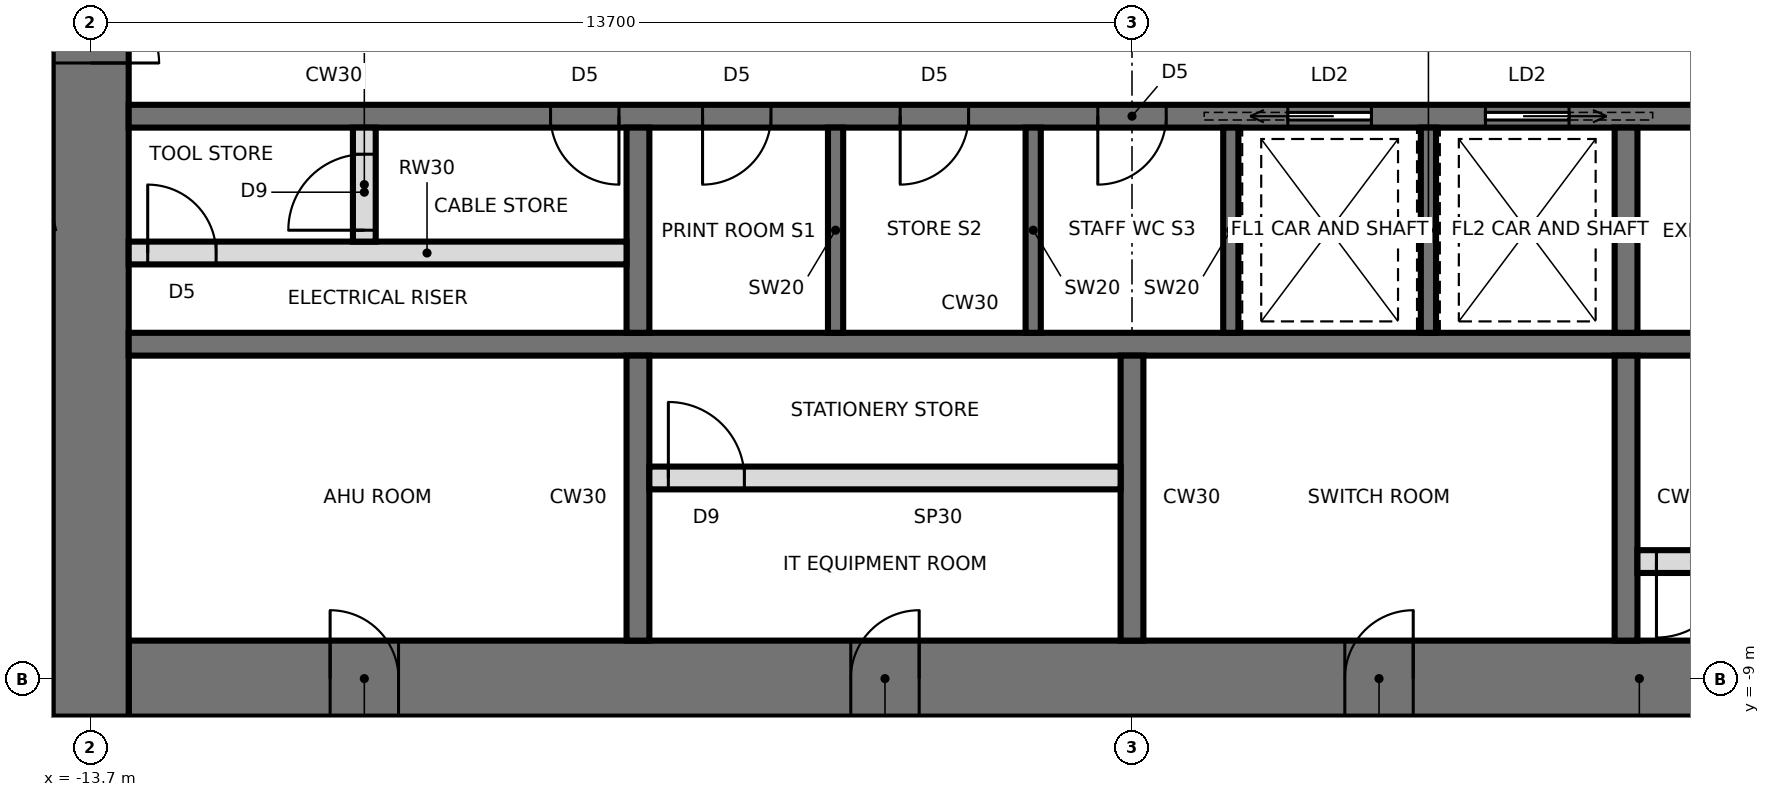
"""IFC4 building model, lengths in metres.
Left out: names, types, materials, properties, quantities, classifications, styles, units other than length and angle.
Written with IfcOpenShell. Run it as: python <this file> out.ifc"""

import sys

from ifc_helpers import new_model, si_unit, direction, frame, frame_2d, origin, place, context, subcontext, project, spatial, rectangle, extrude, element, fill, save


model = new_model("IFC4")
c1 = context("Model", 3, precision=1e-05, world=origin(), true_north=direction((0.0, 1.0)))
c2 = subcontext(c1, "Body", "Model", "MODEL_VIEW")
j1 = project(units=[si_unit("LENGTHUNIT", "METRE"), si_unit("PLANEANGLEUNIT", "RADIAN")], contexts=[c1])
p1 = place(None, origin())
s1 = spatial("IfcSite", under=j1, at=p1, CompositionType="ELEMENT")
p2 = place(p1, origin())
s2 = spatial("IfcBuilding", under=s1, at=p2, CompositionType="ELEMENT")
p3 = place(p2, frame((0.0, 0.0, 272.8)))
s3 = spatial("IfcBuildingStorey", under=s2, at=p3, CompositionType="ELEMENT", Elevation=272.8)
p4 = place(p3, frame((-13.2, -9.0, 0.0), z_axis=(0.0, 0.0, 1.0), x_axis=(1.0, 0.0, 0.0)))
e1 = element("IfcWall", 1, at=p4, inside=s3, PredefinedType="SHEAR", context=c2, shape_type="SweptSolid", body=[
    extrude(rectangle(XDim=26.4, YDim=1.0, at=frame_2d((13.2, 0.0))), origin(), (0.0, 0.0, 1.0), 4.2),
])
p5 = place(p4, frame((2.65, 0.0, 0.0)))
e2 = element("IfcOpeningElement", 2, at=p5, cuts=e1, PredefinedType="OPENING", context=c2, shape_type="SweptSolid", body=[
    extrude(rectangle(XDim=0.9, YDim=2.1, at=frame_2d((0.45, 1.05))), frame((0.0, 0.51, 0.0), z_axis=(0.0, -1.0, 0.0), x_axis=(1.0, 0.0, 0.0)), (0.0, 0.0, 1.0), 1.02),
])
p6 = place(p4, frame((9.5, 0.0, 0.0)))
e3 = element("IfcOpeningElement", 3, at=p6, cuts=e1, PredefinedType="OPENING", context=c2, shape_type="SweptSolid", body=[
    extrude(rectangle(XDim=0.9, YDim=2.1, at=frame_2d((0.45, 1.05))), frame((0.0, 0.51, 0.0), z_axis=(0.0, -1.0, 0.0), x_axis=(1.0, 0.0, 0.0)), (0.0, 0.0, 1.0), 1.02),
])
p7 = place(p4, frame((16.0, 0.0, 0.0)))
e4 = element("IfcOpeningElement", 4, at=p7, cuts=e1, PredefinedType="OPENING", context=c2, shape_type="SweptSolid", body=[
    extrude(rectangle(XDim=0.9, YDim=2.1, at=frame_2d((0.45, 1.05))), frame((0.0, 0.51, 0.0), z_axis=(0.0, -1.0, 0.0), x_axis=(1.0, 0.0, 0.0)), (0.0, 0.0, 1.0), 1.02),
])
p8 = place(p4, frame((22.85, 0.0, 0.0)))
e5 = element("IfcOpeningElement", 5, at=p8, cuts=e1, PredefinedType="OPENING", context=c2, shape_type="SweptSolid", body=[
    extrude(rectangle(XDim=0.9, YDim=2.1, at=frame_2d((0.45, 1.05))), frame((0.0, 0.51, 0.0), z_axis=(0.0, -1.0, 0.0), x_axis=(1.0, 0.0, 0.0)), (0.0, 0.0, 1.0), 1.02),
])
p9 = place(p3, frame((-13.7, 9.5, 0.0), z_axis=(0.0, 0.0, 1.0), x_axis=(0.0, -1.0, 0.0)))
e6 = element("IfcWall", 6, at=p9, inside=s3, PredefinedType="SHEAR", context=c2, shape_type="SweptSolid", body=[
    extrude(rectangle(XDim=19.0, YDim=1.0, at=frame_2d((9.5, 0.0))), origin(), (0.0, 0.0, 1.0), 4.2),
])
p10 = place(p9, frame((8.6, 0.0, 0.0)))
e7 = element("IfcOpeningElement", 7, at=p10, cuts=e6, PredefinedType="OPENING", context=c2, shape_type="SweptSolid", body=[
    extrude(rectangle(XDim=1.8, YDim=2.4, at=frame_2d((0.9, 1.2))), frame((0.0, 0.51, 0.0), z_axis=(0.0, -1.0, 0.0), x_axis=(1.0, 0.0, 0.0)), (0.0, 0.0, 1.0), 1.02),
])
p11 = place(p3, frame((-13.2, -1.6, 0.0), z_axis=(0.0, 0.0, 1.0), x_axis=(1.0, 0.0, 0.0)))
e8 = element("IfcWall", 8, at=p11, inside=s3, PredefinedType="SHEAR", context=c2, shape_type="SweptSolid", body=[
    extrude(rectangle(XDim=26.4, YDim=0.3, at=frame_2d((13.2, 0.0))), origin(), (0.0, 0.0, 1.0), 4.2),
])
p12 = place(p11, frame((25.15, 0.0, 0.0)))
e9 = element("IfcOpeningElement", 9, at=p12, cuts=e8, PredefinedType="OPENING", context=c2, shape_type="SweptSolid", body=[
    extrude(rectangle(XDim=1.0, YDim=2.1, at=frame_2d((0.5, 1.05))), frame((0.0, 0.16, 0.0), z_axis=(0.0, -1.0, 0.0), x_axis=(1.0, 0.0, 0.0)), (0.0, 0.0, 1.0), 0.32),
])
p13 = place(p11, frame((7.55, 0.0, 0.0)))
e10 = element("IfcOpeningElement", 10, at=p13, cuts=e8, PredefinedType="OPENING", context=c2, shape_type="SweptSolid", body=[
    extrude(rectangle(XDim=0.9, YDim=2.1, at=frame_2d((0.45, 1.05))), frame((0.0, 0.16, 0.0), z_axis=(0.0, -1.0, 0.0), x_axis=(1.0, 0.0, 0.0)), (0.0, 0.0, 1.0), 0.32),
])
p14 = place(p11, frame((10.15, 0.0, 0.0)))
e11 = element("IfcOpeningElement", 11, at=p14, cuts=e8, PredefinedType="OPENING", context=c2, shape_type="SweptSolid", body=[
    extrude(rectangle(XDim=0.9, YDim=2.1, at=frame_2d((0.45, 1.05))), frame((0.0, 0.16, 0.0), z_axis=(0.0, -1.0, 0.0), x_axis=(1.0, 0.0, 0.0)), (0.0, 0.0, 1.0), 0.32),
])
p15 = place(p11, frame((12.75, 0.0, 0.0)))
e12 = element("IfcOpeningElement", 12, at=p15, cuts=e8, PredefinedType="OPENING", context=c2, shape_type="SweptSolid", body=[
    extrude(rectangle(XDim=0.9, YDim=2.1, at=frame_2d((0.45, 1.05))), frame((0.0, 0.16, 0.0), z_axis=(0.0, -1.0, 0.0), x_axis=(1.0, 0.0, 0.0)), (0.0, 0.0, 1.0), 0.32),
])
p16 = place(p11, frame((15.25, 0.0, 0.0)))
e13 = element("IfcOpeningElement", 13, at=p16, cuts=e8, PredefinedType="OPENING", context=c2, shape_type="SweptSolid", body=[
    extrude(rectangle(XDim=1.1, YDim=2.3, at=frame_2d((0.55, 1.15))), frame((0.0, 0.16, 0.0), z_axis=(0.0, -1.0, 0.0), x_axis=(1.0, 0.0, 0.0)), (0.0, 0.0, 1.0), 0.32),
])
p17 = place(p11, frame((17.85, 0.0, 0.0)))
e14 = element("IfcOpeningElement", 14, at=p17, cuts=e8, PredefinedType="OPENING", context=c2, shape_type="SweptSolid", body=[
    extrude(rectangle(XDim=1.1, YDim=2.3, at=frame_2d((0.55, 1.15))), frame((0.0, 0.16, 0.0), z_axis=(0.0, -1.0, 0.0), x_axis=(1.0, 0.0, 0.0)), (0.0, 0.0, 1.0), 0.32),
])
p18 = place(p11, frame((5.55, 0.0, 0.0)))
e15 = element("IfcOpeningElement", 15, at=p18, cuts=e8, PredefinedType="OPENING", context=c2, shape_type="SweptSolid", body=[
    extrude(rectangle(XDim=0.9, YDim=2.1, at=frame_2d((0.45, 1.05))), frame((0.0, 0.16, 0.0), z_axis=(0.0, -1.0, 0.0), x_axis=(1.0, 0.0, 0.0)), (0.0, 0.0, 1.0), 0.32),
])
p19 = place(p3, frame((-13.2, -4.6, 0.0), z_axis=(0.0, 0.0, 1.0), x_axis=(1.0, 0.0, 0.0)))
e16 = element("IfcWall", 16, at=p19, inside=s3, PredefinedType="SHEAR", context=c2, shape_type="SweptSolid", body=[
    extrude(rectangle(XDim=26.4, YDim=0.3, at=frame_2d((13.2, 0.0))), origin(), (0.0, 0.0, 1.0), 4.2),
])
p20 = place(p3, frame((-6.5, -1.75, 0.0), z_axis=(0.0, 0.0, 1.0), x_axis=(0.0, -1.0, 0.0)))
e17 = element("IfcWall", 17, at=p20, inside=s3, PredefinedType="SHEAR", context=c2, shape_type="SweptSolid", body=[
    extrude(rectangle(XDim=2.7, YDim=0.3, at=frame_2d((1.35, 0.0))), origin(), (0.0, 0.0, 1.0), 4.2),
])
p21 = place(p3, frame((-6.5, -4.75, 0.0), z_axis=(0.0, 0.0, 1.0), x_axis=(0.0, -1.0, 0.0)))
e18 = element("IfcWall", 18, at=p21, inside=s3, PredefinedType="SHEAR", context=c2, shape_type="SweptSolid", body=[
    extrude(rectangle(XDim=3.75, YDim=0.3, at=frame_2d((1.875, 0.0))), origin(), (0.0, 0.0, 1.0), 4.2),
])
p22 = place(p3, frame((6.5, -1.75, 0.0), z_axis=(0.0, 0.0, 1.0), x_axis=(0.0, -1.0, 0.0)))
e19 = element("IfcWall", 19, at=p22, inside=s3, PredefinedType="SHEAR", context=c2, shape_type="SweptSolid", body=[
    extrude(rectangle(XDim=2.7, YDim=0.3, at=frame_2d((1.35, 0.0))), origin(), (0.0, 0.0, 1.0), 4.2),
])
p23 = place(p3, frame((6.5, -4.75, 0.0), z_axis=(0.0, 0.0, 1.0), x_axis=(0.0, -1.0, 0.0)))
e20 = element("IfcWall", 20, at=p23, inside=s3, PredefinedType="SHEAR", context=c2, shape_type="SweptSolid", body=[
    extrude(rectangle(XDim=3.75, YDim=0.3, at=frame_2d((1.875, 0.0))), origin(), (0.0, 0.0, 1.0), 4.2),
])
for number, where, z_axis, x_axis in (
    (21, (-3.9, -1.75, 0.0), (0.0, 0.0, 1.0), (0.0, -1.0, 0.0)),
    (22, (-1.3, -1.75, 0.0), (0.0, 0.0, 1.0), (0.0, -1.0, 0.0)),
    (23, (1.3, -1.75, 0.0), (0.0, 0.0, 1.0), (0.0, -1.0, 0.0)),
    (24, (3.9, -1.75, 0.0), (0.0, 0.0, 1.0), (0.0, -1.0, 0.0)),
):
    element("IfcWall", number, at=place(p3, frame(where, z_axis=z_axis, x_axis=x_axis)), inside=s3, PredefinedType="SHEAR", context=c2, shape_type="SweptSolid", body=[
        extrude(rectangle(XDim=2.7, YDim=0.2, at=frame_2d((1.35, 0.0))), origin(), (0.0, 0.0, 1.0), 4.2),
    ])
p24 = place(p3, frame((0.0, -4.75, 0.0), z_axis=(0.0, 0.0, 1.0), x_axis=(0.0, -1.0, 0.0)))
e25 = element("IfcWall", 25, at=p24, inside=s3, PredefinedType="SHEAR", context=c2, shape_type="SweptSolid", body=[
    extrude(rectangle(XDim=3.75, YDim=0.3, at=frame_2d((1.875, 0.0))), origin(), (0.0, 0.0, 1.0), 4.2),
])
p25 = place(p3, frame((-6.35, -6.36, 0.0), z_axis=(0.0, 0.0, 1.0), x_axis=(1.0, 0.0, 0.0)))
e26 = element("IfcWall", 26, at=p25, inside=s3, PredefinedType="PARTITIONING", context=c2, shape_type="SweptSolid", body=[
    extrude(rectangle(XDim=6.2, YDim=0.3, at=frame_2d((3.1, 0.0))), origin(), (0.0, 0.0, 1.0), 4.0),
])
p26 = place(p25, frame((0.25, 0.0, 0.0)))
e27 = element("IfcOpeningElement", 27, at=p26, cuts=e26, PredefinedType="OPENING", context=c2, shape_type="SweptSolid", body=[
    extrude(rectangle(XDim=1.0, YDim=2.4, at=frame_2d((0.5, 1.2))), frame((0.0, 0.16, 0.0), z_axis=(0.0, -1.0, 0.0), x_axis=(1.0, 0.0, 0.0)), (0.0, 0.0, 1.0), 0.32),
])
p27 = place(p3, frame((6.65, -7.46, 0.0), z_axis=(0.0, 0.0, 1.0), x_axis=(1.0, 0.0, 0.0)))
e28 = element("IfcWall", 28, at=p27, inside=s3, PredefinedType="PARTITIONING", context=c2, shape_type="SweptSolid", body=[
    extrude(rectangle(XDim=6.55, YDim=0.3, at=frame_2d((3.275, 0.0))), origin(), (0.0, 0.0, 1.0), 4.0),
])
p28 = place(p27, frame((0.25, 0.0, 0.0)))
e29 = element("IfcOpeningElement", 29, at=p28, cuts=e28, PredefinedType="OPENING", context=c2, shape_type="SweptSolid", body=[
    extrude(rectangle(XDim=1.0, YDim=2.4, at=frame_2d((0.5, 1.2))), frame((0.0, 0.16, 0.0), z_axis=(0.0, -1.0, 0.0), x_axis=(1.0, 0.0, 0.0)), (0.0, 0.0, 1.0), 0.32),
])
p29 = place(p3, frame((-13.2, -3.4, 0.0), z_axis=(0.0, 0.0, 1.0), x_axis=(1.0, 0.0, 0.0)))
e30 = element("IfcWall", 30, at=p29, inside=s3, PredefinedType="SOLIDWALL", context=c2, shape_type="SweptSolid", body=[
    extrude(rectangle(XDim=6.55, YDim=0.3, at=frame_2d((3.275, 0.0))), origin(), (0.0, 0.0, 1.0), 4.0),
])
p30 = place(p29, frame((0.25, 0.0, 0.0)))
e31 = element("IfcOpeningElement", 31, at=p30, cuts=e30, PredefinedType="OPENING", context=c2, shape_type="SweptSolid", body=[
    extrude(rectangle(XDim=0.9, YDim=2.1, at=frame_2d((0.45, 1.05))), frame((0.0, 0.16, 0.0), z_axis=(0.0, -1.0, 0.0), x_axis=(1.0, 0.0, 0.0)), (0.0, 0.0, 1.0), 0.32),
])
p31 = place(p3, frame((-10.1, -3.25, 0.0), z_axis=(0.0, 0.0, 1.0), x_axis=(0.0, 1.0, 0.0)))
e32 = element("IfcWall", 32, at=p31, inside=s3, PredefinedType="PARTITIONING", context=c2, shape_type="SweptSolid", body=[
    extrude(rectangle(XDim=1.5, YDim=0.3, at=frame_2d((0.75, 0.0))), origin(), (0.0, 0.0, 1.0), 4.0),
])
p32 = place(p31, frame((0.15, 0.0, 0.0)))
e33 = element("IfcOpeningElement", 33, at=p32, cuts=e32, PredefinedType="OPENING", context=c2, shape_type="SweptSolid", body=[
    extrude(rectangle(XDim=1.0, YDim=2.4, at=frame_2d((0.5, 1.2))), frame((0.0, 0.16, 0.0), z_axis=(0.0, -1.0, 0.0), x_axis=(1.0, 0.0, 0.0)), (0.0, 0.0, 1.0), 0.32),
])
p33 = place(p3, frame((-14.2, -3.018, 0.0), z_axis=(0.0, 0.0, 1.0), x_axis=(-0.978146528585, -0.207916734818, 0.0)))
e34 = element("IfcWall", 34, at=p33, inside=s3, PredefinedType="PARTITIONING", context=c2, shape_type="SweptSolid", body=[
    extrude(rectangle(XDim=7.705, YDim=0.12, at=frame_2d((3.853, 0.0))), origin(), (0.0, 0.0, 1.0), 4.0),
])
p34 = place(p33, frame((3.353, 0.0, 0.0)))
e35 = element("IfcOpeningElement", 35, at=p34, cuts=e34, PredefinedType="OPENING", context=c2, shape_type="SweptSolid", body=[
    extrude(rectangle(XDim=1.0, YDim=2.4, at=frame_2d((0.5, 1.2))), frame((0.0, 0.07, 0.0), z_axis=(0.0, -1.0, 0.0), x_axis=(1.0, 0.0, 0.0)), (0.0, 0.0, 1.0), 0.14),
])
p35 = place(p10, origin())
e36 = element("IfcDoor", 36, at=p35, inside=s3, OperationType="DOUBLE_DOOR_SINGLE_SWING", PredefinedType="DOOR", context=c2, shape_type="SweptSolid", body=[
    extrude(rectangle(XDim=1.72, YDim=2.36, at=frame_2d((0.9, 1.18))), frame((0.0, 0.025, 0.0), z_axis=(0.0, -1.0, 0.0), x_axis=(1.0, 0.0, 0.0)), (0.0, 0.0, 1.0), 0.05),
    extrude(rectangle(XDim=0.04, YDim=2.4, at=frame_2d((0.02, 1.2))), frame((0.0, 0.25, 0.0), z_axis=(0.0, -1.0, 0.0), x_axis=(1.0, 0.0, 0.0)), (0.0, 0.0, 1.0), 0.5),
    extrude(rectangle(XDim=0.04, YDim=2.4, at=frame_2d((1.78, 1.2))), frame((0.0, 0.25, 0.0), z_axis=(0.0, -1.0, 0.0), x_axis=(1.0, 0.0, 0.0)), (0.0, 0.0, 1.0), 0.5),
    extrude(rectangle(XDim=1.72, YDim=0.04, at=frame_2d((0.9, 2.38))), frame((0.0, 0.25, 0.0), z_axis=(0.0, -1.0, 0.0), x_axis=(1.0, 0.0, 0.0)), (0.0, 0.0, 1.0), 0.5),
])
fill(e7, e36)
p36 = place(p13, frame((0.9, 0.0, 0.0), z_axis=(0.0, 0.0, 1.0), x_axis=(-1.0, 0.0, 0.0)))
e37 = element("IfcDoor", 37, at=p36, inside=s3, OperationType="SINGLE_SWING_RIGHT", PredefinedType="DOOR", context=c2, shape_type="SweptSolid", body=[
    extrude(rectangle(XDim=0.9, YDim=2.1, at=frame_2d((0.45, 1.05))), frame((0.0, 0.025, 0.0), z_axis=(0.0, -1.0, 0.0), x_axis=(1.0, 0.0, 0.0)), (0.0, 0.0, 1.0), 0.05),
])
fill(e10, e37)
p37 = place(p14, frame((0.9, 0.0, 0.0), z_axis=(0.0, 0.0, 1.0), x_axis=(-1.0, 0.0, 0.0)))
e38 = element("IfcDoor", 38, at=p37, inside=s3, OperationType="SINGLE_SWING_RIGHT", PredefinedType="DOOR", context=c2, shape_type="SweptSolid", body=[
    extrude(rectangle(XDim=0.9, YDim=2.1, at=frame_2d((0.45, 1.05))), frame((0.0, 0.025, 0.0), z_axis=(0.0, -1.0, 0.0), x_axis=(1.0, 0.0, 0.0)), (0.0, 0.0, 1.0), 0.05),
])
fill(e11, e38)
p38 = place(p15, frame((0.9, 0.0, 0.0), z_axis=(0.0, 0.0, 1.0), x_axis=(-1.0, 0.0, 0.0)))
e39 = element("IfcDoor", 39, at=p38, inside=s3, OperationType="SINGLE_SWING_RIGHT", PredefinedType="DOOR", context=c2, shape_type="SweptSolid", body=[
    extrude(rectangle(XDim=0.9, YDim=2.1, at=frame_2d((0.45, 1.05))), frame((0.0, 0.025, 0.0), z_axis=(0.0, -1.0, 0.0), x_axis=(1.0, 0.0, 0.0)), (0.0, 0.0, 1.0), 0.05),
])
fill(e12, e39)
p39 = place(p16, frame((1.1, 0.0, 0.0), z_axis=(0.0, 0.0, 1.0), x_axis=(-1.0, 0.0, 0.0)))
e40 = element("IfcDoor", 40, at=p39, inside=s3, OperationType="SLIDING_TO_RIGHT", PredefinedType="DOOR", context=c2, shape_type="SweptSolid", body=[
    extrude(rectangle(XDim=1.1, YDim=2.3, at=frame_2d((0.55, 1.15))), frame((0.0, 0.025, 0.0), z_axis=(0.0, -1.0, 0.0), x_axis=(1.0, 0.0, 0.0)), (0.0, 0.0, 1.0), 0.05),
])
fill(e13, e40)
p40 = place(p17, frame((1.1, 0.0, 0.0), z_axis=(0.0, 0.0, 1.0), x_axis=(-1.0, 0.0, 0.0)))
e41 = element("IfcDoor", 41, at=p40, inside=s3, OperationType="SLIDING_TO_LEFT", PredefinedType="DOOR", context=c2, shape_type="SweptSolid", body=[
    extrude(rectangle(XDim=1.1, YDim=2.3, at=frame_2d((0.55, 1.15))), frame((0.0, 0.025, 0.0), z_axis=(0.0, -1.0, 0.0), x_axis=(1.0, 0.0, 0.0)), (0.0, 0.0, 1.0), 0.05),
])
fill(e14, e41)
p41 = place(p18, frame((0.9, 0.0, 0.0), z_axis=(0.0, 0.0, 1.0), x_axis=(-1.0, 0.0, 0.0)))
e42 = element("IfcDoor", 42, at=p41, inside=s3, OperationType="SINGLE_SWING_LEFT", PredefinedType="DOOR", context=c2, shape_type="SweptSolid", body=[
    extrude(rectangle(XDim=0.9, YDim=2.1, at=frame_2d((0.45, 1.05))), frame((0.0, 0.025, 0.0), z_axis=(0.0, -1.0, 0.0), x_axis=(1.0, 0.0, 0.0)), (0.0, 0.0, 1.0), 0.05),
])
fill(e15, e42)
p42 = place(p5, origin())
e43 = element("IfcDoor", 43, at=p42, inside=s3, OperationType="SINGLE_SWING_LEFT", PredefinedType="DOOR", context=c2, shape_type="SweptSolid", body=[
    extrude(rectangle(XDim=0.82, YDim=2.06, at=frame_2d((0.45, 1.03))), frame((0.0, 0.025, 0.0), z_axis=(0.0, -1.0, 0.0), x_axis=(1.0, 0.0, 0.0)), (0.0, 0.0, 1.0), 0.05),
    extrude(rectangle(XDim=0.04, YDim=2.1, at=frame_2d((0.02, 1.05))), frame((0.0, 0.25, 0.0), z_axis=(0.0, -1.0, 0.0), x_axis=(1.0, 0.0, 0.0)), (0.0, 0.0, 1.0), 0.5),
    extrude(rectangle(XDim=0.04, YDim=2.1, at=frame_2d((0.88, 1.05))), frame((0.0, 0.25, 0.0), z_axis=(0.0, -1.0, 0.0), x_axis=(1.0, 0.0, 0.0)), (0.0, 0.0, 1.0), 0.5),
    extrude(rectangle(XDim=0.82, YDim=0.04, at=frame_2d((0.45, 2.08))), frame((0.0, 0.25, 0.0), z_axis=(0.0, -1.0, 0.0), x_axis=(1.0, 0.0, 0.0)), (0.0, 0.0, 1.0), 0.5),
])
fill(e2, e43)
p43 = place(p6, origin())
e44 = element("IfcDoor", 44, at=p43, inside=s3, OperationType="SINGLE_SWING_RIGHT", PredefinedType="DOOR", context=c2, shape_type="SweptSolid", body=[
    extrude(rectangle(XDim=0.82, YDim=2.06, at=frame_2d((0.45, 1.03))), frame((0.0, 0.025, 0.0), z_axis=(0.0, -1.0, 0.0), x_axis=(1.0, 0.0, 0.0)), (0.0, 0.0, 1.0), 0.05),
    extrude(rectangle(XDim=0.04, YDim=2.1, at=frame_2d((0.02, 1.05))), frame((0.0, 0.25, 0.0), z_axis=(0.0, -1.0, 0.0), x_axis=(1.0, 0.0, 0.0)), (0.0, 0.0, 1.0), 0.5),
    extrude(rectangle(XDim=0.04, YDim=2.1, at=frame_2d((0.88, 1.05))), frame((0.0, 0.25, 0.0), z_axis=(0.0, -1.0, 0.0), x_axis=(1.0, 0.0, 0.0)), (0.0, 0.0, 1.0), 0.5),
    extrude(rectangle(XDim=0.82, YDim=0.04, at=frame_2d((0.45, 2.08))), frame((0.0, 0.25, 0.0), z_axis=(0.0, -1.0, 0.0), x_axis=(1.0, 0.0, 0.0)), (0.0, 0.0, 1.0), 0.5),
])
fill(e3, e44)
p44 = place(p7, origin())
e45 = element("IfcDoor", 45, at=p44, inside=s3, OperationType="SINGLE_SWING_RIGHT", PredefinedType="DOOR", context=c2, shape_type="SweptSolid", body=[
    extrude(rectangle(XDim=0.82, YDim=2.06, at=frame_2d((0.45, 1.03))), frame((0.0, 0.025, 0.0), z_axis=(0.0, -1.0, 0.0), x_axis=(1.0, 0.0, 0.0)), (0.0, 0.0, 1.0), 0.05),
    extrude(rectangle(XDim=0.04, YDim=2.1, at=frame_2d((0.02, 1.05))), frame((0.0, 0.25, 0.0), z_axis=(0.0, -1.0, 0.0), x_axis=(1.0, 0.0, 0.0)), (0.0, 0.0, 1.0), 0.5),
    extrude(rectangle(XDim=0.04, YDim=2.1, at=frame_2d((0.88, 1.05))), frame((0.0, 0.25, 0.0), z_axis=(0.0, -1.0, 0.0), x_axis=(1.0, 0.0, 0.0)), (0.0, 0.0, 1.0), 0.5),
    extrude(rectangle(XDim=0.82, YDim=0.04, at=frame_2d((0.45, 2.08))), frame((0.0, 0.25, 0.0), z_axis=(0.0, -1.0, 0.0), x_axis=(1.0, 0.0, 0.0)), (0.0, 0.0, 1.0), 0.5),
])
fill(e4, e45)
p45 = place(p26, origin())
e46 = element("IfcDoor", 46, at=p45, inside=s3, OperationType="SINGLE_SWING_LEFT", PredefinedType="DOOR", context=c2, shape_type="SweptSolid", body=[
    extrude(rectangle(XDim=1.0, YDim=2.4, at=frame_2d((0.5, 1.2))), frame((0.0, 0.025, 0.0), z_axis=(0.0, -1.0, 0.0), x_axis=(1.0, 0.0, 0.0)), (0.0, 0.0, 1.0), 0.05),
])
fill(e27, e46)
p46 = place(p28, frame((1.0, 0.0, 0.0), z_axis=(0.0, 0.0, 1.0), x_axis=(-1.0, 0.0, 0.0)))
e47 = element("IfcDoor", 47, at=p46, inside=s3, OperationType="SINGLE_SWING_RIGHT", PredefinedType="DOOR", context=c2, shape_type="SweptSolid", body=[
    extrude(rectangle(XDim=1.0, YDim=2.4, at=frame_2d((0.5, 1.2))), frame((0.0, 0.025, 0.0), z_axis=(0.0, -1.0, 0.0), x_axis=(1.0, 0.0, 0.0)), (0.0, 0.0, 1.0), 0.05),
])
fill(e29, e47)
p47 = place(p30, origin())
e48 = element("IfcDoor", 48, at=p47, inside=s3, OperationType="SINGLE_SWING_LEFT", PredefinedType="DOOR", context=c2, shape_type="SweptSolid", body=[
    extrude(rectangle(XDim=0.9, YDim=2.1, at=frame_2d((0.45, 1.05))), frame((0.0, 0.025, 0.0), z_axis=(0.0, -1.0, 0.0), x_axis=(1.0, 0.0, 0.0)), (0.0, 0.0, 1.0), 0.05),
])
fill(e31, e48)
p48 = place(p32, origin())
e49 = element("IfcDoor", 49, at=p48, inside=s3, OperationType="SINGLE_SWING_LEFT", PredefinedType="DOOR", context=c2, shape_type="SweptSolid", body=[
    extrude(rectangle(XDim=1.0, YDim=2.4, at=frame_2d((0.5, 1.2))), frame((0.0, 0.025, 0.0), z_axis=(0.0, -1.0, 0.0), x_axis=(1.0, 0.0, 0.0)), (0.0, 0.0, 1.0), 0.05),
])
fill(e33, e49)
save(model, sys.argv[1])
